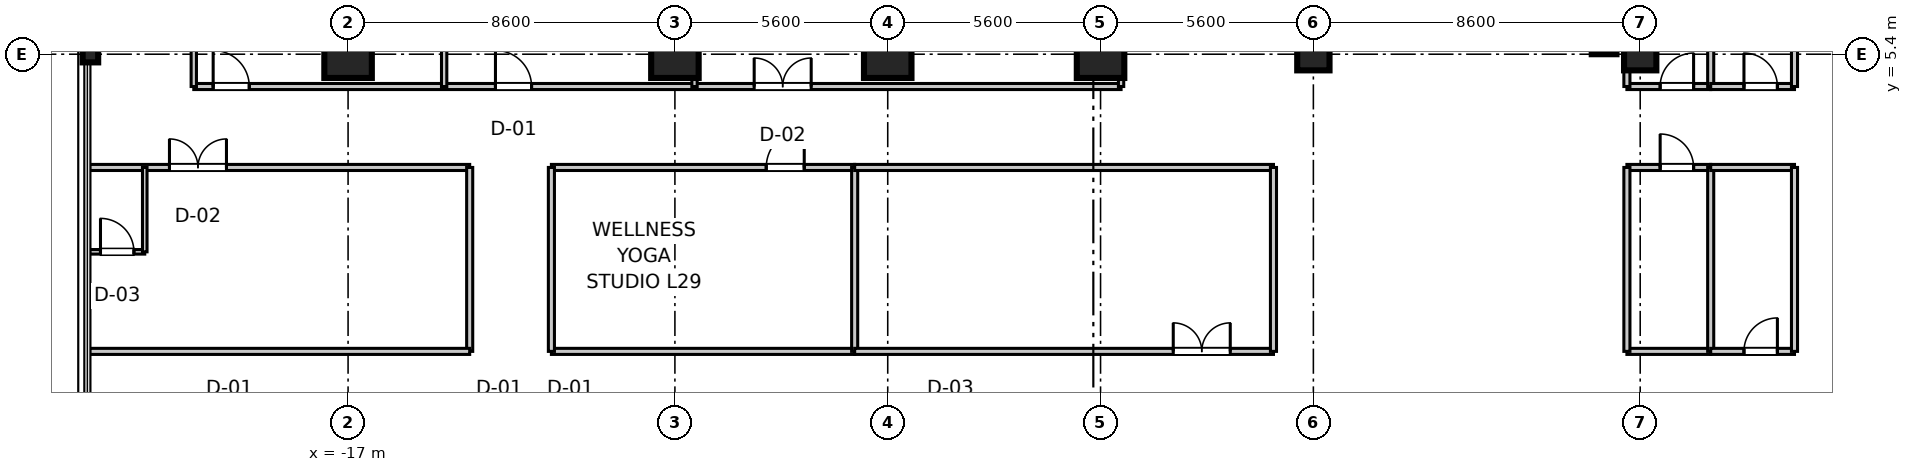
"""IFC4 building model, lengths in metres.
Left out: names, types, materials, properties, quantities, classifications, styles, units other than length and angle.
Written with IfcOpenShell. Run it as: python <this file> out.ifc"""

import sys

from ifc_helpers import new_model, si_unit, direction, frame, frame_2d, origin, origin_2d, place, context, subcontext, project, spatial, rectangle, i_section, extrude, source, transform, mapped, element, fill, save


model = new_model("IFC4")
c1 = context("Model", 3, precision=1e-05, world=origin(), true_north=direction((0.0, 1.0)))
c2 = subcontext(c1, "Body", "Model", "MODEL_VIEW")
j1 = project(units=[si_unit("LENGTHUNIT", "METRE"), si_unit("PLANEANGLEUNIT", "RADIAN")], contexts=[c1])
p1 = place(None, origin())
s1 = spatial("IfcSite", under=j1, at=p1, CompositionType="ELEMENT")
p2 = place(p1, origin())
s2 = spatial("IfcBuilding", under=s1, at=p2, CompositionType="ELEMENT")
p3 = place(p2, frame((0.0, 0.0, 117.5)))
s3 = spatial("IfcBuildingStorey", under=s2, at=p3, CompositionType="ELEMENT", Elevation=117.5)
m1 = source(origin(), c2, "Body", "SweptSolid", [
    extrude(rectangle(XDim=1.25, YDim=1.25, at=origin_2d()), origin(), (0.0, 0.0, 1.0), 3.605),
])
for number, where, z_axis, x_axis in (
    (1, (-17.0, 5.4, 0.0), (0.0, 0.0, 1.0), (1.0, 0.0, 0.0)),
    (2, (-8.4, 5.4, 0.0), (0.0, 0.0, 1.0), (1.0, 0.0, 0.0)),
    (3, (-2.8, 5.4, 0.0), (0.0, 0.0, 1.0), (1.0, 0.0, 0.0)),
    (4, (2.8, 5.4, 0.0), (0.0, 0.0, 1.0), (1.0, 0.0, 0.0)),
):
    element("IfcColumn", number, at=place(p3, frame(where, z_axis=z_axis, x_axis=x_axis)), inside=s3, PredefinedType="COLUMN", context=c2, shape_type="MappedRepresentation", body=[
        mapped(m1, transform((0.0, 0.0, 0.0), scale=1.0)),
    ])
m2 = source(origin(), c2, "Body", "SweptSolid", [
    extrude(rectangle(XDim=0.85, YDim=0.85, at=origin_2d()), origin(), (0.0, 0.0, 1.0), 3.605),
])
for number, where, z_axis, x_axis in (
    (5, (8.4, 5.4, 0.0), (0.0, 0.0, 1.0), (1.0, 0.0, 0.0)),
    (6, (17.0, 5.4, 0.0), (0.0, 0.0, 1.0), (1.0, 0.0, 0.0)),
):
    element("IfcColumn", number, at=place(p3, frame(where, z_axis=z_axis, x_axis=x_axis)), inside=s3, PredefinedType="PILASTER", context=c2, shape_type="MappedRepresentation", body=[
        mapped(m2, transform((0.0, 0.0, 0.0), scale=1.0)),
    ])
m3 = source(origin(), c2, "Body", "SweptSolid", [
    extrude(i_section(OverallWidth=0.409, OverallDepth=0.43, WebThickness=0.021, FlangeThickness=0.034, at=origin_2d()), origin(), (0.0, 0.0, 1.0), 3.605),
])
p4 = place(p3, frame((-23.78, 5.4, 0.0), z_axis=(0.0, 0.0, 1.0), x_axis=(1.0, 0.0, 0.0)))
e7 = element("IfcColumn", 7, at=p4, inside=s3, PredefinedType="COLUMN", context=c2, shape_type="MappedRepresentation", body=[
    mapped(m3, transform((0.0, 0.0, 0.0), scale=1.0)),
])
m4 = source(origin(), c2, "Body", "SweptSolid", [
    extrude(rectangle(XDim=11.6, YDim=0.65, at=frame_2d((5.8, 0.0))), origin(), (0.0, 0.0, 1.0), 3.38),
])
p5 = place(p3, frame((16.05, 5.4, 0.0), z_axis=(0.0, 0.0, 1.0), x_axis=(0.0, 1.0, 0.0)))
e8 = element("IfcWall", 8, at=p5, inside=s3, PredefinedType="SHEAR", context=c2, shape_type="MappedRepresentation", body=[
    mapped(m4, transform((0.0, 0.0, 0.0), scale=1.0)),
])
m5 = source(origin(), c2, "Body", "SweptSolid", [
    extrude(rectangle(XDim=2.205, YDim=0.16, at=frame_2d((1.103, 0.0))), origin(), (0.0, 0.0, 1.0), 2.72),
])
p6 = place(p3, frame((16.65, 4.55, 0.0), z_axis=(0.0, 0.0, 1.0), x_axis=(1.0, 0.0, 0.0)))
e9 = element("IfcWall", 9, at=p6, inside=s3, PredefinedType="PARTITIONING", context=c2, shape_type="MappedRepresentation", body=[
    mapped(m5, transform((0.0, 0.0, 0.0), scale=1.0)),
])
p7 = place(p6, frame((0.875, 0.0, 0.0)))
e10 = element("IfcOpeningElement", 10, at=p7, cuts=e9, PredefinedType="OPENING", context=c2, shape_type="SweptSolid", body=[
    extrude(rectangle(XDim=0.88, YDim=2.1, at=frame_2d((0.44, 1.05))), frame((0.0, 0.09, 0.0), z_axis=(0.0, -1.0, 0.0), x_axis=(1.0, 0.0, 0.0)), (0.0, 0.0, 1.0), 0.18),
])
m6 = source(origin(), c2, "Body", "SweptSolid", [
    extrude(rectangle(XDim=19.25, YDim=0.16, at=frame_2d((9.625, 0.0))), origin(), (0.0, 0.0, 1.0), 2.72),
])
for number, where, z_axis, x_axis in (
    (11, (16.65, 4.55, 0.0), (0.0, 0.0, 1.0), (0.0, 1.0, 0.0)),
    (12, (18.855, 4.55, 0.0), (0.0, 0.0, 1.0), (0.0, 1.0, 0.0)),
):
    element("IfcWall", number, at=place(p3, frame(where, z_axis=z_axis, x_axis=x_axis)), inside=s3, PredefinedType="PARTITIONING", context=c2, shape_type="MappedRepresentation", body=[
        mapped(m6, transform((0.0, 0.0, 0.0), scale=1.0)),
    ])
p8 = place(p3, frame((18.855, 4.55, 0.0), z_axis=(0.0, 0.0, 1.0), x_axis=(1.0, 0.0, 0.0)))
e13 = element("IfcWall", 13, at=p8, inside=s3, PredefinedType="PARTITIONING", context=c2, shape_type="MappedRepresentation", body=[
    mapped(m5, transform((0.0, 0.0, 0.0), scale=1.0)),
])
p9 = place(p8, frame((0.875, 0.0, 0.0)))
e14 = element("IfcOpeningElement", 14, at=p9, cuts=e13, PredefinedType="OPENING", context=c2, shape_type="SweptSolid", body=[
    extrude(rectangle(XDim=0.88, YDim=2.1, at=frame_2d((0.44, 1.05))), frame((0.0, 0.09, 0.0), z_axis=(0.0, -1.0, 0.0), x_axis=(1.0, 0.0, 0.0)), (0.0, 0.0, 1.0), 0.18),
])
m7 = source(origin(), c2, "Body", "SweptSolid", [
    extrude(rectangle(XDim=17.83, YDim=0.16, at=frame_2d((8.915, 0.0))), origin(), (0.0, 0.0, 1.0), 2.72),
])
p10 = place(p3, frame((21.06, 4.55, 0.0), z_axis=(0.0, 0.0, 1.0), x_axis=(0.0, 1.0, 0.0)))
e15 = element("IfcWall", 15, at=p10, inside=s3, PredefinedType="PARTITIONING", context=c2, shape_type="MappedRepresentation", body=[
    mapped(m7, transform((0.0, 0.0, 0.0), scale=1.0)),
])
m8 = source(origin(), c2, "Body", "SweptSolid", [
    extrude(rectangle(XDim=24.4, YDim=0.16, at=frame_2d((12.2, 0.0))), origin(), (0.0, 0.0, 1.0), 2.72),
])
p11 = place(p3, frame((-21.06, 4.55, 0.0), z_axis=(0.0, 0.0, 1.0), x_axis=(1.0, 0.0, 0.0)))
e16 = element("IfcWall", 16, at=p11, inside=s3, PredefinedType="PARTITIONING", context=c2, shape_type="MappedRepresentation", body=[
    mapped(m8, transform((0.0, 0.0, 0.0), scale=1.0)),
])
p12 = place(p11, frame((0.51, 0.0, 0.0)))
e17 = element("IfcOpeningElement", 17, at=p12, cuts=e16, PredefinedType="OPENING", context=c2, shape_type="SweptSolid", body=[
    extrude(rectangle(XDim=0.95, YDim=2.1, at=frame_2d((0.475, 1.05))), frame((0.0, 0.09, 0.0), z_axis=(0.0, -1.0, 0.0), x_axis=(1.0, 0.0, 0.0)), (0.0, 0.0, 1.0), 0.18),
])
p13 = place(p11, frame((7.938, 0.0, 0.0)))
e18 = element("IfcOpeningElement", 18, at=p13, cuts=e16, PredefinedType="OPENING", context=c2, shape_type="SweptSolid", body=[
    extrude(rectangle(XDim=0.95, YDim=2.1, at=frame_2d((0.475, 1.05))), frame((0.0, 0.09, 0.0), z_axis=(0.0, -1.0, 0.0), x_axis=(1.0, 0.0, 0.0)), (0.0, 0.0, 1.0), 0.18),
])
p14 = place(p11, frame((14.746, 0.0, 0.0)))
e19 = element("IfcOpeningElement", 19, at=p14, cuts=e16, PredefinedType="OPENING", context=c2, shape_type="SweptSolid", body=[
    extrude(rectangle(XDim=1.5, YDim=2.15, at=frame_2d((0.75, 1.075))), frame((0.0, 0.09, 0.0), z_axis=(0.0, -1.0, 0.0), x_axis=(1.0, 0.0, 0.0)), (0.0, 0.0, 1.0), 0.18),
])
m9 = source(origin(), c2, "Body", "SweptSolid", [
    extrude(rectangle(XDim=17.83, YDim=0.14, at=frame_2d((8.915, 0.0))), origin(), (0.0, 0.0, 1.0), 2.72),
])
p15 = place(p3, frame((-21.06, 4.55, 0.0), z_axis=(0.0, 0.0, 1.0), x_axis=(0.0, 1.0, 0.0)))
e20 = element("IfcWall", 20, at=p15, inside=s3, PredefinedType="PARTITIONING", context=c2, shape_type="MappedRepresentation", body=[
    mapped(m9, transform((0.0, 0.0, 0.0), scale=1.0)),
])
m10 = source(origin(), c2, "Body", "SweptSolid", [
    extrude(rectangle(XDim=19.25, YDim=0.14, at=frame_2d((9.625, 0.0))), origin(), (0.0, 0.0, 1.0), 2.72),
])
for number, where, z_axis, x_axis in (
    (21, (3.34, 4.55, 0.0), (0.0, 0.0, 1.0), (0.0, 1.0, 0.0)),
    (22, (-14.472, 4.55, 0.0), (0.0, 0.0, 1.0), (0.0, 1.0, 0.0)),
    (23, (-7.884, 4.55, 0.0), (0.0, 0.0, 1.0), (0.0, 1.0, 0.0)),
):
    element("IfcWall", number, at=place(p3, frame(where, z_axis=z_axis, x_axis=x_axis)), inside=s3, PredefinedType="PARTITIONING", context=c2, shape_type="MappedRepresentation", body=[
        mapped(m10, transform((0.0, 0.0, 0.0), scale=1.0)),
    ])
m11 = source(origin(), c2, "Body", "SweptSolid", [
    extrude(rectangle(XDim=10.0, YDim=0.16, at=frame_2d((5.0, 0.0))), origin(), (0.0, 0.0, 1.0), 2.72),
])
p16 = place(p3, frame((-23.8, 2.42, 0.0), z_axis=(0.0, 0.0, 1.0), x_axis=(1.0, 0.0, 0.0)))
e24 = element("IfcWall", 24, at=p16, inside=s3, PredefinedType="PARTITIONING", context=c2, shape_type="MappedRepresentation", body=[
    mapped(m11, transform((0.0, 0.0, 0.0), scale=1.0)),
])
p17 = place(p16, frame((2.1, 0.0, 0.0)))
e25 = element("IfcOpeningElement", 25, at=p17, cuts=e24, PredefinedType="OPENING", context=c2, shape_type="SweptSolid", body=[
    extrude(rectangle(XDim=1.5, YDim=2.15, at=frame_2d((0.75, 1.075))), frame((0.0, 0.09, 0.0), z_axis=(0.0, -1.0, 0.0), x_axis=(1.0, 0.0, 0.0)), (0.0, 0.0, 1.0), 0.18),
])
m12 = source(origin(), c2, "Body", "SweptSolid", [
    extrude(rectangle(XDim=4.84, YDim=0.16, at=frame_2d((2.42, 0.0))), origin(), (0.0, 0.0, 1.0), 2.72),
])
p18 = place(p3, frame((-13.8, -2.42, 0.0), z_axis=(0.0, 0.0, 1.0), x_axis=(0.0, 1.0, 0.0)))
e26 = element("IfcWall", 26, at=p18, inside=s3, PredefinedType="PARTITIONING", context=c2, shape_type="MappedRepresentation", body=[
    mapped(m12, transform((0.0, 0.0, 0.0), scale=1.0)),
])
p19 = place(p3, frame((-23.8, -2.42, 0.0), z_axis=(0.0, 0.0, 1.0), x_axis=(1.0, 0.0, 0.0)))
e27 = element("IfcWall", 27, at=p19, inside=s3, PredefinedType="PARTITIONING", context=c2, shape_type="MappedRepresentation", body=[
    mapped(m11, transform((0.0, 0.0, 0.0), scale=1.0)),
])
m13 = source(origin(), c2, "Body", "SweptSolid", [
    extrude(rectangle(XDim=1.45, YDim=0.12, at=frame_2d((0.725, 0.0))), origin(), (0.0, 0.0, 1.0), 2.72),
])
p20 = place(p3, frame((-23.8, 0.2, 0.0), z_axis=(0.0, 0.0, 1.0), x_axis=(1.0, 0.0, 0.0)))
e28 = element("IfcWall", 28, at=p20, inside=s3, PredefinedType="PARTITIONING", context=c2, shape_type="MappedRepresentation", body=[
    mapped(m13, transform((0.0, 0.0, 0.0), scale=1.0)),
])
p21 = place(p20, frame((0.285, 0.0, 0.0)))
e29 = element("IfcOpeningElement", 29, at=p21, cuts=e28, PredefinedType="OPENING", context=c2, shape_type="SweptSolid", body=[
    extrude(rectangle(XDim=0.88, YDim=2.1, at=frame_2d((0.44, 1.05))), frame((0.0, 0.07, 0.0), z_axis=(0.0, -1.0, 0.0), x_axis=(1.0, 0.0, 0.0)), (0.0, 0.0, 1.0), 0.14),
])
m14 = source(origin(), c2, "Body", "SweptSolid", [
    extrude(rectangle(XDim=2.22, YDim=0.12, at=frame_2d((1.11, 0.0))), origin(), (0.0, 0.0, 1.0), 2.72),
])
p22 = place(p3, frame((-22.35, 0.2, 0.0), z_axis=(0.0, 0.0, 1.0), x_axis=(0.0, 1.0, 0.0)))
e30 = element("IfcWall", 30, at=p22, inside=s3, PredefinedType="PARTITIONING", context=c2, shape_type="MappedRepresentation", body=[
    mapped(m14, transform((0.0, 0.0, 0.0), scale=1.0)),
])
m15 = source(origin(), c2, "Body", "SweptSolid", [
    extrude(rectangle(XDim=7.98, YDim=0.16, at=frame_2d((3.99, 0.0))), origin(), (0.0, 0.0, 1.0), 2.72),
])
p23 = place(p3, frame((-11.65, -2.42, 0.0), z_axis=(0.0, 0.0, 1.0), x_axis=(1.0, 0.0, 0.0)))
e31 = element("IfcWall", 31, at=p23, inside=s3, PredefinedType="PARTITIONING", context=c2, shape_type="MappedRepresentation", body=[
    mapped(m15, transform((0.0, 0.0, 0.0), scale=1.0)),
])
p24 = place(p3, frame((-11.65, 2.42, 0.0), z_axis=(0.0, 0.0, 1.0), x_axis=(1.0, 0.0, 0.0)))
e32 = element("IfcWall", 32, at=p24, inside=s3, PredefinedType="PARTITIONING", context=c2, shape_type="MappedRepresentation", body=[
    mapped(m15, transform((0.0, 0.0, 0.0), scale=1.0)),
])
p25 = place(p24, frame((5.653, 0.0, 0.0)))
e33 = element("IfcOpeningElement", 33, at=p25, cuts=e32, PredefinedType="OPENING", context=c2, shape_type="SweptSolid", body=[
    extrude(rectangle(XDim=1.0, YDim=2.1, at=frame_2d((0.5, 1.05))), frame((0.0, 0.09, 0.0), z_axis=(0.0, -1.0, 0.0), x_axis=(1.0, 0.0, 0.0)), (0.0, 0.0, 1.0), 0.18),
])
for number, where, z_axis, x_axis in (
    (34, (-11.65, -2.42, 0.0), (0.0, 0.0, 1.0), (0.0, 1.0, 0.0)),
    (35, (-3.67, -2.42, 0.0), (0.0, 0.0, 1.0), (0.0, 1.0, 0.0)),
):
    element("IfcWall", number, at=place(p3, frame(where, z_axis=z_axis, x_axis=x_axis)), inside=s3, PredefinedType="PARTITIONING", context=c2, shape_type="MappedRepresentation", body=[
        mapped(m12, transform((0.0, 0.0, 0.0), scale=1.0)),
    ])
m16 = source(origin(), c2, "Body", "SweptSolid", [
    extrude(rectangle(XDim=11.02, YDim=0.16, at=frame_2d((5.51, 0.0))), origin(), (0.0, 0.0, 1.0), 2.72),
])
p26 = place(p3, frame((-3.67, -2.42, 0.0), z_axis=(0.0, 0.0, 1.0), x_axis=(1.0, 0.0, 0.0)))
e36 = element("IfcWall", 36, at=p26, inside=s3, PredefinedType="PARTITIONING", context=c2, shape_type="MappedRepresentation", body=[
    mapped(m16, transform((0.0, 0.0, 0.0), scale=1.0)),
])
p27 = place(p26, frame((8.383, 0.0, 0.0)))
e37 = element("IfcOpeningElement", 37, at=p27, cuts=e36, PredefinedType="OPENING", context=c2, shape_type="SweptSolid", body=[
    extrude(rectangle(XDim=1.5, YDim=2.15, at=frame_2d((0.75, 1.075))), frame((0.0, 0.09, 0.0), z_axis=(0.0, -1.0, 0.0), x_axis=(1.0, 0.0, 0.0)), (0.0, 0.0, 1.0), 0.18),
])
p28 = place(p3, frame((-3.67, 2.42, 0.0), z_axis=(0.0, 0.0, 1.0), x_axis=(1.0, 0.0, 0.0)))
e38 = element("IfcWall", 38, at=p28, inside=s3, PredefinedType="PARTITIONING", context=c2, shape_type="MappedRepresentation", body=[
    mapped(m16, transform((0.0, 0.0, 0.0), scale=1.0)),
])
p29 = place(p3, frame((7.35, -2.42, 0.0), z_axis=(0.0, 0.0, 1.0), x_axis=(0.0, 1.0, 0.0)))
e39 = element("IfcWall", 39, at=p29, inside=s3, PredefinedType="PARTITIONING", context=c2, shape_type="MappedRepresentation", body=[
    mapped(m12, transform((0.0, 0.0, 0.0), scale=1.0)),
])
p30 = place(p3, frame((16.65, -2.42, 0.0), z_axis=(0.0, 0.0, 1.0), x_axis=(1.0, 0.0, 0.0)))
e40 = element("IfcWall", 40, at=p30, inside=s3, PredefinedType="PARTITIONING", context=c2, shape_type="MappedRepresentation", body=[
    mapped(m5, transform((0.0, 0.0, 0.0), scale=1.0)),
])
p31 = place(p3, frame((16.65, 2.42, 0.0), z_axis=(0.0, 0.0, 1.0), x_axis=(1.0, 0.0, 0.0)))
e41 = element("IfcWall", 41, at=p31, inside=s3, PredefinedType="PARTITIONING", context=c2, shape_type="MappedRepresentation", body=[
    mapped(m5, transform((0.0, 0.0, 0.0), scale=1.0)),
])
p32 = place(p31, frame((0.875, 0.0, 0.0)))
e42 = element("IfcOpeningElement", 42, at=p32, cuts=e41, PredefinedType="OPENING", context=c2, shape_type="SweptSolid", body=[
    extrude(rectangle(XDim=0.88, YDim=2.1, at=frame_2d((0.44, 1.05))), frame((0.0, 0.09, 0.0), z_axis=(0.0, -1.0, 0.0), x_axis=(1.0, 0.0, 0.0)), (0.0, 0.0, 1.0), 0.18),
])
for number, where, z_axis, x_axis in (
    (43, (16.65, -2.42, 0.0), (0.0, 0.0, 1.0), (0.0, 1.0, 0.0)),
    (44, (18.855, -2.42, 0.0), (0.0, 0.0, 1.0), (0.0, 1.0, 0.0)),
):
    element("IfcWall", number, at=place(p3, frame(where, z_axis=z_axis, x_axis=x_axis)), inside=s3, PredefinedType="PARTITIONING", context=c2, shape_type="MappedRepresentation", body=[
        mapped(m12, transform((0.0, 0.0, 0.0), scale=1.0)),
    ])
p33 = place(p3, frame((18.855, -2.42, 0.0), z_axis=(0.0, 0.0, 1.0), x_axis=(1.0, 0.0, 0.0)))
e45 = element("IfcWall", 45, at=p33, inside=s3, PredefinedType="PARTITIONING", context=c2, shape_type="MappedRepresentation", body=[
    mapped(m5, transform((0.0, 0.0, 0.0), scale=1.0)),
])
p34 = place(p33, frame((0.875, 0.0, 0.0)))
e46 = element("IfcOpeningElement", 46, at=p34, cuts=e45, PredefinedType="OPENING", context=c2, shape_type="SweptSolid", body=[
    extrude(rectangle(XDim=0.88, YDim=2.1, at=frame_2d((0.44, 1.05))), frame((0.0, 0.09, 0.0), z_axis=(0.0, -1.0, 0.0), x_axis=(1.0, 0.0, 0.0)), (0.0, 0.0, 1.0), 0.18),
])
p35 = place(p3, frame((18.855, 2.42, 0.0), z_axis=(0.0, 0.0, 1.0), x_axis=(1.0, 0.0, 0.0)))
e47 = element("IfcWall", 47, at=p35, inside=s3, PredefinedType="PARTITIONING", context=c2, shape_type="MappedRepresentation", body=[
    mapped(m5, transform((0.0, 0.0, 0.0), scale=1.0)),
])
p36 = place(p3, frame((21.06, -2.42, 0.0), z_axis=(0.0, 0.0, 1.0), x_axis=(0.0, 1.0, 0.0)))
e48 = element("IfcWall", 48, at=p36, inside=s3, PredefinedType="PARTITIONING", context=c2, shape_type="MappedRepresentation", body=[
    mapped(m12, transform((0.0, 0.0, 0.0), scale=1.0)),
])
m17 = source(origin(), c2, "Body", "SweptSolid", [
    extrude(rectangle(XDim=0.88, YDim=2.1, at=frame_2d((0.44, 1.05))), frame((0.0, 0.025, 0.0), z_axis=(0.0, -1.0, 0.0), x_axis=(1.0, 0.0, 0.0)), (0.0, 0.0, 1.0), 0.05),
])
p37 = place(p7, origin())
e49 = element("IfcDoor", 49, at=p37, inside=s3, OperationType="SINGLE_SWING_RIGHT", PredefinedType="DOOR", context=c2, shape_type="MappedRepresentation", body=[
    mapped(m17, transform((0.0, 0.0, 0.0), scale=1.0)),
])
fill(e10, e49)
p38 = place(p9, origin())
e50 = element("IfcDoor", 50, at=p38, inside=s3, OperationType="SINGLE_SWING_LEFT", PredefinedType="DOOR", context=c2, shape_type="MappedRepresentation", body=[
    mapped(m17, transform((0.0, 0.0, 0.0), scale=1.0)),
])
fill(e14, e50)
m18 = source(origin(), c2, "Body", "SweptSolid", [
    extrude(rectangle(XDim=0.95, YDim=2.1, at=frame_2d((0.475, 1.05))), frame((0.0, 0.025, 0.0), z_axis=(0.0, -1.0, 0.0), x_axis=(1.0, 0.0, 0.0)), (0.0, 0.0, 1.0), 0.05),
])
p39 = place(p12, origin())
e51 = element("IfcDoor", 51, at=p39, inside=s3, OperationType="SINGLE_SWING_LEFT", PredefinedType="DOOR", context=c2, shape_type="MappedRepresentation", body=[
    mapped(m18, transform((0.0, 0.0, 0.0), scale=1.0)),
])
fill(e17, e51)
p40 = place(p13, origin())
e52 = element("IfcDoor", 52, at=p40, inside=s3, OperationType="SINGLE_SWING_LEFT", PredefinedType="DOOR", context=c2, shape_type="MappedRepresentation", body=[
    mapped(m18, transform((0.0, 0.0, 0.0), scale=1.0)),
])
fill(e18, e52)
m19 = source(origin(), c2, "Body", "SweptSolid", [
    extrude(rectangle(XDim=1.5, YDim=2.15, at=frame_2d((0.75, 1.075))), frame((0.0, 0.025, 0.0), z_axis=(0.0, -1.0, 0.0), x_axis=(1.0, 0.0, 0.0)), (0.0, 0.0, 1.0), 0.05),
])
p41 = place(p14, origin())
e53 = element("IfcDoor", 53, at=p41, inside=s3, OperationType="DOUBLE_DOOR_SINGLE_SWING", PredefinedType="DOOR", context=c2, shape_type="MappedRepresentation", body=[
    mapped(m19, transform((0.0, 0.0, 0.0), scale=1.0)),
])
fill(e19, e53)
p42 = place(p21, origin())
e54 = element("IfcDoor", 54, at=p42, inside=s3, OperationType="SINGLE_SWING_LEFT", PredefinedType="DOOR", context=c2, shape_type="MappedRepresentation", body=[
    mapped(m17, transform((0.0, 0.0, 0.0), scale=1.0)),
])
fill(e29, e54)
p43 = place(p17, origin())
e55 = element("IfcDoor", 55, at=p43, inside=s3, OperationType="DOUBLE_DOOR_SINGLE_SWING", PredefinedType="DOOR", context=c2, shape_type="MappedRepresentation", body=[
    mapped(m19, transform((0.0, 0.0, 0.0), scale=1.0)),
])
fill(e25, e55)
m20 = source(origin(), c2, "Body", "SweptSolid", [
    extrude(rectangle(XDim=1.0, YDim=2.1, at=frame_2d((0.5, 1.05))), frame((0.0, 0.025, 0.0), z_axis=(0.0, -1.0, 0.0), x_axis=(1.0, 0.0, 0.0)), (0.0, 0.0, 1.0), 0.05),
])
p44 = place(p25, frame((1.0, 0.0, 0.0), z_axis=(0.0, 0.0, 1.0), x_axis=(-1.0, 0.0, 0.0)))
e56 = element("IfcDoor", 56, at=p44, inside=s3, OperationType="SINGLE_SWING_RIGHT", PredefinedType="DOOR", context=c2, shape_type="MappedRepresentation", body=[
    mapped(m20, transform((0.0, 0.0, 0.0), scale=1.0)),
])
fill(e33, e56)
p45 = place(p27, origin())
e57 = element("IfcDoor", 57, at=p45, inside=s3, OperationType="DOUBLE_DOOR_SINGLE_SWING", PredefinedType="DOOR", context=c2, shape_type="MappedRepresentation", body=[
    mapped(m19, transform((0.0, 0.0, 0.0), scale=1.0)),
])
fill(e37, e57)
p46 = place(p32, frame((0.88, 0.0, 0.0), z_axis=(0.0, 0.0, 1.0), x_axis=(-1.0, 0.0, 0.0)))
e58 = element("IfcDoor", 58, at=p46, inside=s3, OperationType="SINGLE_SWING_LEFT", PredefinedType="DOOR", context=c2, shape_type="MappedRepresentation", body=[
    mapped(m17, transform((0.0, 0.0, 0.0), scale=1.0)),
])
fill(e42, e58)
p47 = place(p34, origin())
e59 = element("IfcDoor", 59, at=p47, inside=s3, OperationType="SINGLE_SWING_RIGHT", PredefinedType="DOOR", context=c2, shape_type="MappedRepresentation", body=[
    mapped(m17, transform((0.0, 0.0, 0.0), scale=1.0)),
])
fill(e46, e59)
save(model, sys.argv[1])
